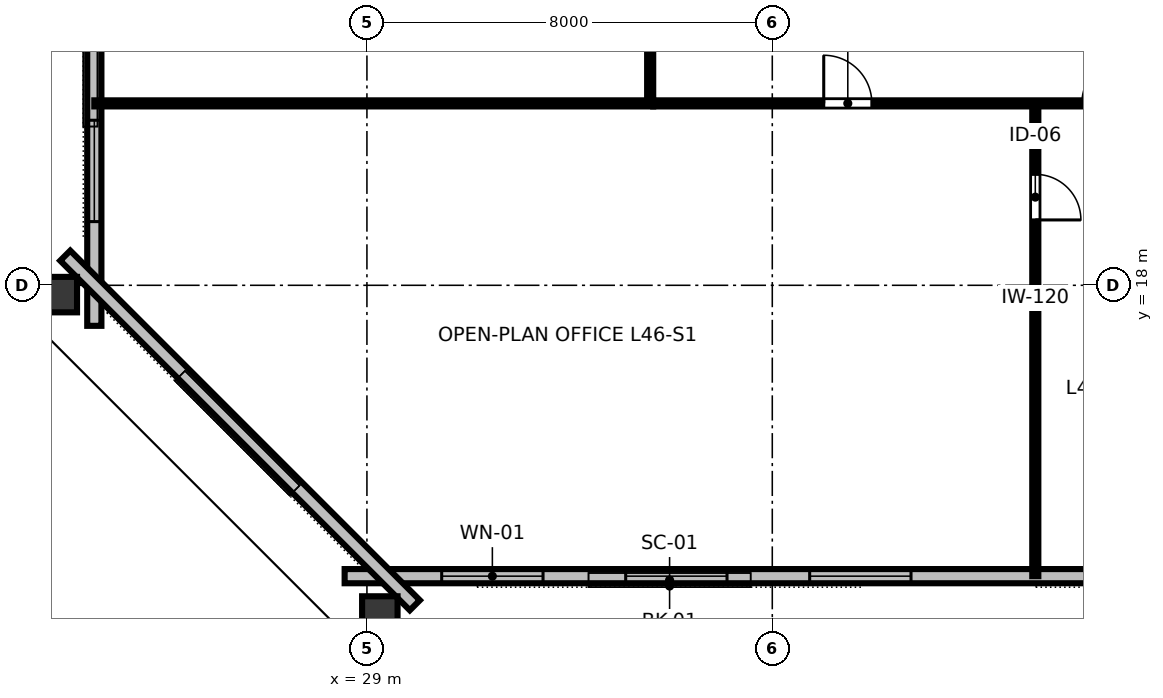
"""IFC4 building model, lengths in metres.
Left out: names, types, materials, properties, quantities, classifications, styles, units other than length and angle.
Written with IfcOpenShell. Run it as: python <this file> out.ifc"""

import sys

from ifc_helpers import new_model, si_unit, direction, frame, frame_2d, origin, origin_2d, place, context, subcontext, project, spatial, rectangle, hollow_rectangle, extrude, element, fill, save


model = new_model("IFC4")
c1 = context("Model", 3, precision=1e-05, world=origin(), true_north=direction((0.0, 1.0)))
c2 = subcontext(c1, "Body", "Model", "MODEL_VIEW")
j1 = project(units=[si_unit("LENGTHUNIT", "METRE"), si_unit("PLANEANGLEUNIT", "RADIAN")], contexts=[c1])
p1 = place(None, origin())
s1 = spatial("IfcSite", under=j1, at=p1, CompositionType="ELEMENT")
p2 = place(p1, origin())
s2 = spatial("IfcBuilding", under=s1, at=p2, CompositionType="ELEMENT")
p3 = place(p2, frame((0.0, 0.0, 177.0)))
s3 = spatial("IfcBuildingStorey", under=s2, at=p3, CompositionType="ELEMENT", Elevation=177.0)
for number, where, z_axis, x_axis in (
    (1, (29.255, 11.438, 0.0), (0.0, 0.0, 1.0), (1.0, 0.0, 0.0)),
    (2, (22.854, 17.816, 0.0), (0.0, 0.0, 1.0), (0.0, 1.0, 0.0)),
):
    element("IfcColumn", number, at=place(p3, frame(where, z_axis=z_axis, x_axis=x_axis)), inside=s3, PredefinedType="COLUMN", context=c2, shape_type="SweptSolid", body=[
        extrude(hollow_rectangle(XDim=0.7, YDim=0.85, WallThickness=0.04, at=origin_2d()), origin(), (0.0, 0.0, 1.0), 3.358),
    ])
p4 = place(p3, frame((28.56, 12.26, 0.0), z_axis=(0.0, 0.0, 1.0), x_axis=(1.0, 0.0, 0.0)))
e3 = element("IfcWall", 3, at=p4, inside=s3, PredefinedType="STANDARD", context=c2, shape_type="SweptSolid", body=[
    extrude(rectangle(XDim=34.88, YDim=0.28, at=frame_2d((17.44, 0.0))), origin(), (0.0, 0.0, 1.0), 3.36),
])
p5 = place(p4, frame((1.916, 0.0, 0.8)))
e4 = element("IfcOpeningElement", 4, at=p5, cuts=e3, PredefinedType="OPENING", context=c2, shape_type="SweptSolid", body=[
    extrude(rectangle(XDim=2.0, YDim=1.95, at=frame_2d((1.0, 0.975))), frame((0.0, 0.15, 0.0), z_axis=(0.0, -1.0, 0.0), x_axis=(1.0, 0.0, 0.0)), (0.0, 0.0, 1.0), 0.3),
])
p6 = place(p4, frame((5.547, 0.0, 0.8)))
e5 = element("IfcOpeningElement", 5, at=p6, cuts=e3, PredefinedType="OPENING", context=c2, shape_type="SweptSolid", body=[
    extrude(rectangle(XDim=2.0, YDim=1.95, at=frame_2d((1.0, 0.975))), frame((0.0, 0.15, 0.0), z_axis=(0.0, -1.0, 0.0), x_axis=(1.0, 0.0, 0.0)), (0.0, 0.0, 1.0), 0.3),
])
p7 = place(p4, frame((9.178, 0.0, 0.8)))
e6 = element("IfcOpeningElement", 6, at=p7, cuts=e3, PredefinedType="OPENING", context=c2, shape_type="SweptSolid", body=[
    extrude(rectangle(XDim=2.0, YDim=1.95, at=frame_2d((1.0, 0.975))), frame((0.0, 0.15, 0.0), z_axis=(0.0, -1.0, 0.0), x_axis=(1.0, 0.0, 0.0)), (0.0, 0.0, 1.0), 0.3),
])
p8 = place(p4, frame((20.071, 0.0, 0.8)))
e7 = element("IfcOpeningElement", 7, at=p8, cuts=e3, PredefinedType="OPENING", context=c2, shape_type="SweptSolid", body=[
    extrude(rectangle(XDim=2.0, YDim=1.95, at=frame_2d((1.0, 0.975))), frame((0.0, 0.15, 0.0), z_axis=(0.0, -1.0, 0.0), x_axis=(1.0, 0.0, 0.0)), (0.0, 0.0, 1.0), 0.3),
])
p9 = place(p4, frame((27.333, 0.0, 0.8)))
e8 = element("IfcOpeningElement", 8, at=p9, cuts=e3, PredefinedType="OPENING", context=c2, shape_type="SweptSolid", body=[
    extrude(rectangle(XDim=2.0, YDim=1.95, at=frame_2d((1.0, 0.975))), frame((0.0, 0.15, 0.0), z_axis=(0.0, -1.0, 0.0), x_axis=(1.0, 0.0, 0.0)), (0.0, 0.0, 1.0), 0.3),
])
p10 = place(p4, frame((30.964, 0.0, 0.8)))
e9 = element("IfcOpeningElement", 9, at=p10, cuts=e3, PredefinedType="OPENING", context=c2, shape_type="SweptSolid", body=[
    extrude(rectangle(XDim=2.0, YDim=1.95, at=frame_2d((1.0, 0.975))), frame((0.0, 0.15, 0.0), z_axis=(0.0, -1.0, 0.0), x_axis=(1.0, 0.0, 0.0)), (0.0, 0.0, 1.0), 0.3),
])
p11 = place(p3, frame((23.62, 46.8, 0.0), z_axis=(0.0, 0.0, 1.0), x_axis=(0.0, -1.0, 0.0)))
e10 = element("IfcWall", 10, at=p11, inside=s3, PredefinedType="STANDARD", context=c2, shape_type="SweptSolid", body=[
    extrude(rectangle(XDim=29.6, YDim=0.28, at=frame_2d((14.8, 0.0))), origin(), (0.0, 0.0, 1.0), 3.36),
])
p12 = place(p11, frame((2.057, 0.0, 0.8)))
e11 = element("IfcOpeningElement", 11, at=p12, cuts=e10, PredefinedType="OPENING", context=c2, shape_type="SweptSolid", body=[
    extrude(rectangle(XDim=2.0, YDim=1.95, at=frame_2d((1.0, 0.975))), frame((0.0, 0.15, 0.0), z_axis=(0.0, -1.0, 0.0), x_axis=(1.0, 0.0, 0.0)), (0.0, 0.0, 1.0), 0.3),
])
p13 = place(p11, frame((5.971, 0.0, 0.8)))
e12 = element("IfcOpeningElement", 12, at=p13, cuts=e10, PredefinedType="OPENING", context=c2, shape_type="SweptSolid", body=[
    extrude(rectangle(XDim=2.0, YDim=1.95, at=frame_2d((1.0, 0.975))), frame((0.0, 0.15, 0.0), z_axis=(0.0, -1.0, 0.0), x_axis=(1.0, 0.0, 0.0)), (0.0, 0.0, 1.0), 0.3),
])
p14 = place(p11, frame((9.886, 0.0, 0.8)))
e13 = element("IfcOpeningElement", 13, at=p14, cuts=e10, PredefinedType="OPENING", context=c2, shape_type="SweptSolid", body=[
    extrude(rectangle(XDim=2.0, YDim=1.95, at=frame_2d((1.0, 0.975))), frame((0.0, 0.15, 0.0), z_axis=(0.0, -1.0, 0.0), x_axis=(1.0, 0.0, 0.0)), (0.0, 0.0, 1.0), 0.3),
])
p15 = place(p11, frame((17.714, 0.0, 0.8)))
e14 = element("IfcOpeningElement", 14, at=p15, cuts=e10, PredefinedType="OPENING", context=c2, shape_type="SweptSolid", body=[
    extrude(rectangle(XDim=2.0, YDim=1.95, at=frame_2d((1.0, 0.975))), frame((0.0, 0.15, 0.0), z_axis=(0.0, -1.0, 0.0), x_axis=(1.0, 0.0, 0.0)), (0.0, 0.0, 1.0), 0.3),
])
p16 = place(p11, frame((21.629, 0.0, 0.8)))
e15 = element("IfcOpeningElement", 15, at=p16, cuts=e10, PredefinedType="OPENING", context=c2, shape_type="SweptSolid", body=[
    extrude(rectangle(XDim=2.0, YDim=1.95, at=frame_2d((1.0, 0.975))), frame((0.0, 0.15, 0.0), z_axis=(0.0, -1.0, 0.0), x_axis=(1.0, 0.0, 0.0)), (0.0, 0.0, 1.0), 0.3),
])
p17 = place(p11, frame((25.543, 0.0, 0.8)))
e16 = element("IfcOpeningElement", 16, at=p17, cuts=e10, PredefinedType="OPENING", context=c2, shape_type="SweptSolid", body=[
    extrude(rectangle(XDim=2.0, YDim=1.95, at=frame_2d((1.0, 0.975))), frame((0.0, 0.15, 0.0), z_axis=(0.0, -1.0, 0.0), x_axis=(1.0, 0.0, 0.0)), (0.0, 0.0, 1.0), 0.3),
])
p18 = place(p3, frame((23.046, 18.585, 0.0), z_axis=(0.0, 0.0, 1.0), x_axis=(0.707106781187, -0.707106781187, 0.0)))
e17 = element("IfcWall", 17, at=p18, inside=s3, PredefinedType="STANDARD", context=c2, shape_type="SweptSolid", body=[
    extrude(rectangle(XDim=9.757, YDim=0.28, at=frame_2d((4.879, 0.0))), origin(), (0.0, 0.0, 1.0), 3.36),
])
p19 = place(p3, frame((42.191, 21.59, 0.0), z_axis=(0.0, 0.0, 1.0), x_axis=(0.0, -1.0, 0.0)))
e18 = element("IfcWall", 18, at=p19, inside=s3, PredefinedType="PARTITIONING", context=c2, shape_type="SweptSolid", body=[
    extrude(rectangle(XDim=9.33, YDim=0.12, at=frame_2d((4.665, 0.0))), origin(), (0.0, 0.0, 1.0), 2.64),
])
p20 = place(p19, frame((1.4, 0.0, 0.0)))
e19 = element("IfcOpeningElement", 19, at=p20, cuts=e18, PredefinedType="OPENING", context=c2, shape_type="SweptSolid", body=[
    extrude(rectangle(XDim=0.9, YDim=2.15, at=frame_2d((0.45, 1.075))), frame((0.0, 0.07, 0.0), z_axis=(0.0, -1.0, 0.0), x_axis=(1.0, 0.0, 0.0)), (0.0, 0.0, 1.0), 0.14),
])
p21 = place(p3, frame((34.65, 21.59, 0.0), z_axis=(0.0, 0.0, 1.0), x_axis=(1.0, 0.0, 0.0)))
e20 = element("IfcWall", 20, at=p21, inside=s3, PredefinedType="PARTITIONING", context=c2, shape_type="SweptSolid", body=[
    extrude(rectangle(XDim=10.33, YDim=0.12, at=frame_2d((5.165, 0.0))), origin(), (0.0, 0.0, 1.0), 2.64),
])
p22 = place(p21, frame((3.365, 0.0, 0.0)))
e21 = element("IfcOpeningElement", 21, at=p22, cuts=e20, PredefinedType="OPENING", context=c2, shape_type="SweptSolid", body=[
    extrude(rectangle(XDim=0.95, YDim=2.15, at=frame_2d((0.475, 1.075))), frame((0.0, 0.07, 0.0), z_axis=(0.0, -1.0, 0.0), x_axis=(1.0, 0.0, 0.0)), (0.0, 0.0, 1.0), 0.14),
])
p23 = place(p21, frame((8.46, 0.0, 0.0)))
e22 = element("IfcOpeningElement", 22, at=p23, cuts=e20, PredefinedType="OPENING", context=c2, shape_type="SweptSolid", body=[
    extrude(rectangle(XDim=0.95, YDim=2.15, at=frame_2d((0.475, 1.075))), frame((0.0, 0.07, 0.0), z_axis=(0.0, -1.0, 0.0), x_axis=(1.0, 0.0, 0.0)), (0.0, 0.0, 1.0), 0.14),
])
p24 = place(p3, frame((34.59, 21.65, 0.0), z_axis=(0.0, 0.0, 1.0), x_axis=(0.0, 1.0, 0.0)))
e23 = element("IfcWall", 23, at=p24, inside=s3, PredefinedType="PARTITIONING", context=c2, shape_type="SweptSolid", body=[
    extrude(rectangle(XDim=20.7, YDim=0.12, at=frame_2d((10.35, 0.0))), origin(), (0.0, 0.0, 1.0), 2.64),
])
p25 = place(p24, frame((9.875, 0.0, 0.0)))
e24 = element("IfcOpeningElement", 24, at=p25, cuts=e23, PredefinedType="OPENING", context=c2, shape_type="SweptSolid", body=[
    extrude(rectangle(XDim=0.95, YDim=2.15, at=frame_2d((0.475, 1.075))), frame((0.0, 0.07, 0.0), z_axis=(0.0, -1.0, 0.0), x_axis=(1.0, 0.0, 0.0)), (0.0, 0.0, 1.0), 0.14),
])
p26 = place(p3, frame((34.65, 21.59, 0.0), z_axis=(0.0, 0.0, 1.0), x_axis=(-1.0, 0.0, 0.0)))
e25 = element("IfcWall", 25, at=p26, inside=s3, PredefinedType="PARTITIONING", context=c2, shape_type="SweptSolid", body=[
    extrude(rectangle(XDim=11.03, YDim=0.12, at=frame_2d((5.515, 0.0))), origin(), (0.0, 0.0, 1.0), 2.64),
])
p27 = place(p5, origin())
e26 = element("IfcWindow", 26, at=p27, inside=s3, PartitioningType="SINGLE_PANEL", PredefinedType="WINDOW", context=c2, shape_type="SweptSolid", body=[
    extrude(rectangle(XDim=2.0, YDim=1.95, at=frame_2d((1.0, 0.975))), frame((0.0, 0.03, 0.0), z_axis=(0.0, -1.0, 0.0), x_axis=(1.0, 0.0, 0.0)), (0.0, 0.0, 1.0), 0.06),
])
fill(e4, e26)
p28 = place(p6, origin())
e27 = element("IfcWindow", 27, at=p28, inside=s3, PartitioningType="SINGLE_PANEL", PredefinedType="WINDOW", context=c2, shape_type="SweptSolid", body=[
    extrude(rectangle(XDim=2.0, YDim=1.95, at=frame_2d((1.0, 0.975))), frame((0.0, 0.03, 0.0), z_axis=(0.0, -1.0, 0.0), x_axis=(1.0, 0.0, 0.0)), (0.0, 0.0, 1.0), 0.06),
])
fill(e5, e27)
p29 = place(p7, origin())
e28 = element("IfcWindow", 28, at=p29, inside=s3, PartitioningType="SINGLE_PANEL", PredefinedType="WINDOW", context=c2, shape_type="SweptSolid", body=[
    extrude(rectangle(XDim=2.0, YDim=1.95, at=frame_2d((1.0, 0.975))), frame((0.0, 0.03, 0.0), z_axis=(0.0, -1.0, 0.0), x_axis=(1.0, 0.0, 0.0)), (0.0, 0.0, 1.0), 0.06),
])
fill(e6, e28)
p30 = place(p17, origin())
e29 = element("IfcWindow", 29, at=p30, inside=s3, PartitioningType="SINGLE_PANEL", PredefinedType="WINDOW", context=c2, shape_type="SweptSolid", body=[
    extrude(rectangle(XDim=2.0, YDim=1.95, at=frame_2d((1.0, 0.975))), frame((0.0, 0.03, 0.0), z_axis=(0.0, -1.0, 0.0), x_axis=(1.0, 0.0, 0.0)), (0.0, 0.0, 1.0), 0.06),
])
fill(e16, e29)
p31 = place(p20, origin())
e30 = element("IfcDoor", 30, at=p31, inside=s3, OperationType="SINGLE_SWING_RIGHT", PredefinedType="DOOR", context=c2, shape_type="SweptSolid", body=[
    extrude(rectangle(XDim=0.9, YDim=2.15, at=frame_2d((0.45, 1.075))), frame((0.0, 0.025, 0.0), z_axis=(0.0, -1.0, 0.0), x_axis=(1.0, 0.0, 0.0)), (0.0, 0.0, 1.0), 0.05),
])
fill(e19, e30)
p32 = place(p22, origin())
e31 = element("IfcDoor", 31, at=p32, inside=s3, OperationType="SINGLE_SWING_LEFT", PredefinedType="DOOR", context=c2, shape_type="SweptSolid", body=[
    extrude(rectangle(XDim=0.95, YDim=2.15, at=frame_2d((0.475, 1.075))), frame((0.0, 0.025, 0.0), z_axis=(0.0, -1.0, 0.0), x_axis=(1.0, 0.0, 0.0)), (0.0, 0.0, 1.0), 0.05),
])
fill(e21, e31)
p33 = place(p23, origin())
e32 = element("IfcDoor", 32, at=p33, inside=s3, OperationType="SINGLE_SWING_RIGHT", PredefinedType="DOOR", context=c2, shape_type="SweptSolid", body=[
    extrude(rectangle(XDim=0.95, YDim=2.15, at=frame_2d((0.475, 1.075))), frame((0.0, 0.025, 0.0), z_axis=(0.0, -1.0, 0.0), x_axis=(1.0, 0.0, 0.0)), (0.0, 0.0, 1.0), 0.05),
])
fill(e22, e32)
save(model, sys.argv[1])
